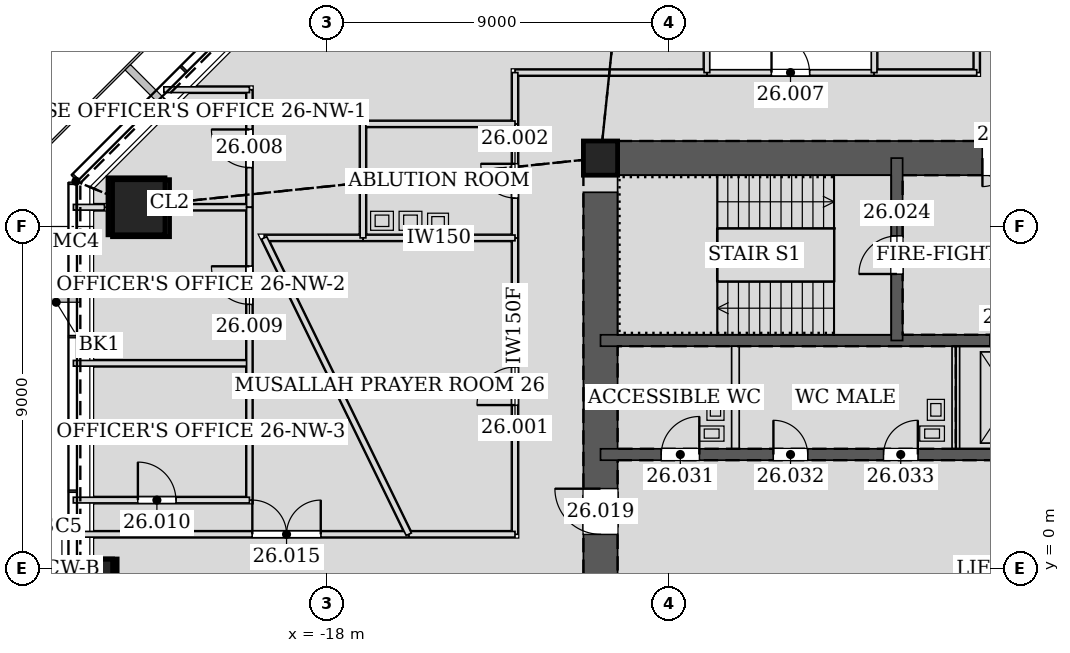
"""IFC4 building model, lengths in metres.
Left out: names, types, materials, properties, quantities, classifications, styles, units other than length and angle.
Written with IfcOpenShell. Run it as: python <this file> out.ifc"""

import sys

from ifc_helpers import new_model, si_unit, direction, frame, frame_2d, origin, origin_2d, place, context, subcontext, project, spatial, rectangle, hollow_rectangle, extrude, element, fill, save


model = new_model("IFC4")
c1 = context("Model", 3, precision=1e-05, world=origin(), true_north=direction((0.0, 1.0)))
c2 = subcontext(c1, "Body", "Model", "MODEL_VIEW")
j1 = project(units=[si_unit("LENGTHUNIT", "METRE"), si_unit("PLANEANGLEUNIT", "RADIAN")], contexts=[c1])
p1 = place(None, origin())
s1 = spatial("IfcSite", under=j1, at=p1, CompositionType="ELEMENT")
p2 = place(p1, origin())
s2 = spatial("IfcBuilding", under=s1, at=p2, CompositionType="ELEMENT")
p3 = place(p2, frame((0.0, 0.0, 117.6)))
s3 = spatial("IfcBuildingStorey", under=s2, at=p3, CompositionType="ELEMENT", Elevation=117.6)
p4 = place(p3, frame((-23.01, 9.531, 0.0), z_axis=(0.028295730207, -0.011736627314, 0.99953069149), x_axis=(0.383133442967, 0.923693003589, 0.0)))
e1 = element("IfcColumn", 1, at=p4, inside=s3, PredefinedType="COLUMN", context=c2, shape_type="SweptSolid", body=[
    extrude(hollow_rectangle(XDim=1.5, YDim=1.5, WallThickness=0.07, at=origin_2d()), origin(), (0.0, 0.0, 1.0), 4.202),
])
p5 = place(p3, frame((-23.888, 0.0, 0.0), z_axis=(0.028297679255, 0.0, 0.99959954049), x_axis=(0.0, 1.0, 0.0)))
e2 = element("IfcColumn", 2, at=p5, inside=s3, PredefinedType="COLUMN", context=c2, shape_type="SweptSolid", body=[
    extrude(hollow_rectangle(XDim=0.5, YDim=0.5, WallThickness=0.025, at=origin_2d()), origin(), (0.0, 0.0, 1.0), 4.202),
])
p6 = place(p3, frame((-10.8, 10.8, 0.0), z_axis=(0.0, 0.0, 1.0), x_axis=(1.0, 0.0, 0.0)))
e3 = element("IfcColumn", 3, at=p6, inside=s3, PredefinedType="COLUMN", context=c2, shape_type="SweptSolid", body=[
    extrude(hollow_rectangle(XDim=0.9, YDim=0.9, WallThickness=0.06, at=origin_2d()), origin(), (0.0, 0.0, 1.0), 4.2),
])
p7 = place(p3, frame((10.8, 10.8, 0.0), z_axis=(0.0, 0.0, 1.0), x_axis=(-1.0, 0.0, 0.0)))
e4 = element("IfcWall", 4, at=p7, inside=s3, PredefinedType="SOLIDWALL", context=c2, shape_type="SweptSolid", body=[
    extrude(rectangle(XDim=21.6, YDim=0.9, at=frame_2d((10.8, 0.0))), origin(), (0.0, 0.0, 1.0), 4.2),
])
p8 = place(p7, frame((10.05, 0.0, 0.0)))
e5 = element("IfcOpeningElement", 5, at=p8, cuts=e4, PredefinedType="OPENING", context=c2, shape_type="SweptSolid", body=[
    extrude(rectangle(XDim=1.5, YDim=2.1, at=frame_2d((0.75, 1.05))), frame((0.0, 0.46, 0.0), z_axis=(0.0, -1.0, 0.0), x_axis=(1.0, 0.0, 0.0)), (0.0, 0.0, 1.0), 0.92),
])
p9 = place(p3, frame((-10.8, 10.8, 0.0), z_axis=(0.0, 0.0, 1.0), x_axis=(0.0, -1.0, 0.0)))
e6 = element("IfcWall", 6, at=p9, inside=s3, PredefinedType="SOLIDWALL", context=c2, shape_type="SweptSolid", body=[
    extrude(rectangle(XDim=21.6, YDim=0.9, at=frame_2d((10.8, 0.0))), origin(), (0.0, 0.0, 1.0), 4.2),
])
p10 = place(p9, frame((8.7, 0.0, 0.0)))
e7 = element("IfcOpeningElement", 7, at=p10, cuts=e6, PredefinedType="OPENING", context=c2, shape_type="SweptSolid", body=[
    extrude(rectangle(XDim=1.2, YDim=2.1, at=frame_2d((0.6, 1.05))), frame((0.0, 0.46, 0.0), z_axis=(0.0, -1.0, 0.0), x_axis=(1.0, 0.0, 0.0)), (0.0, 0.0, 1.0), 0.92),
])
p11 = place(p9, frame((11.7, 0.0, 0.0)))
e8 = element("IfcOpeningElement", 8, at=p11, cuts=e6, PredefinedType="OPENING", context=c2, shape_type="SweptSolid", body=[
    extrude(rectangle(XDim=1.2, YDim=2.1, at=frame_2d((0.6, 1.05))), frame((0.0, 0.46, 0.0), z_axis=(0.0, -1.0, 0.0), x_axis=(1.0, 0.0, 0.0)), (0.0, 0.0, 1.0), 0.92),
])
p12 = place(p3, frame((-10.8, 3.0, 0.0), z_axis=(0.0, 0.0, 1.0), x_axis=(1.0, 0.0, 0.0)))
e9 = element("IfcWall", 9, at=p12, inside=s3, PredefinedType="SOLIDWALL", context=c2, shape_type="SweptSolid", body=[
    extrude(rectangle(XDim=21.6, YDim=0.3, at=frame_2d((10.8, 0.0))), origin(), (0.0, 0.0, 1.0), 4.2),
])
p13 = place(p12, frame((1.6, 0.0, 0.0)))
e10 = element("IfcOpeningElement", 10, at=p13, cuts=e9, PredefinedType="OPENING", context=c2, shape_type="SweptSolid", body=[
    extrude(rectangle(XDim=1.0, YDim=2.1, at=frame_2d((0.5, 1.05))), frame((0.0, 0.16, 0.0), z_axis=(0.0, -1.0, 0.0), x_axis=(1.0, 0.0, 0.0)), (0.0, 0.0, 1.0), 0.32),
])
p14 = place(p12, frame((4.55, 0.0, 0.0)))
e11 = element("IfcOpeningElement", 11, at=p14, cuts=e9, PredefinedType="OPENING", context=c2, shape_type="SweptSolid", body=[
    extrude(rectangle(XDim=0.9, YDim=2.1, at=frame_2d((0.45, 1.05))), frame((0.0, 0.16, 0.0), z_axis=(0.0, -1.0, 0.0), x_axis=(1.0, 0.0, 0.0)), (0.0, 0.0, 1.0), 0.32),
])
p15 = place(p12, frame((7.45, 0.0, 0.0)))
e12 = element("IfcOpeningElement", 12, at=p15, cuts=e9, PredefinedType="OPENING", context=c2, shape_type="SweptSolid", body=[
    extrude(rectangle(XDim=0.9, YDim=2.1, at=frame_2d((0.45, 1.05))), frame((0.0, 0.16, 0.0), z_axis=(0.0, -1.0, 0.0), x_axis=(1.0, 0.0, 0.0)), (0.0, 0.0, 1.0), 0.32),
])
p16 = place(p12, frame((13.25, 0.0, 0.0)))
e13 = element("IfcOpeningElement", 13, at=p16, cuts=e9, PredefinedType="OPENING", context=c2, shape_type="SweptSolid", body=[
    extrude(rectangle(XDim=0.9, YDim=2.1, at=frame_2d((0.45, 1.05))), frame((0.0, 0.16, 0.0), z_axis=(0.0, -1.0, 0.0), x_axis=(1.0, 0.0, 0.0)), (0.0, 0.0, 1.0), 0.32),
])
p17 = place(p3, frame((-10.8, 6.0, 0.0), z_axis=(0.0, 0.0, 1.0), x_axis=(1.0, 0.0, 0.0)))
e14 = element("IfcWall", 14, at=p17, inside=s3, PredefinedType="SOLIDWALL", context=c2, shape_type="SweptSolid", body=[
    extrude(rectangle(XDim=21.6, YDim=0.3, at=frame_2d((10.8, 0.0))), origin(), (0.0, 0.0, 1.0), 4.2),
])
p18 = place(p17, frame((10.25, 0.0, 0.0)))
e15 = element("IfcOpeningElement", 15, at=p18, cuts=e14, PredefinedType="OPENING", context=c2, shape_type="SweptSolid", body=[
    extrude(rectangle(XDim=1.1, YDim=2.1, at=frame_2d((0.55, 1.05))), frame((0.0, 0.16, 0.0), z_axis=(0.0, -1.0, 0.0), x_axis=(1.0, 0.0, 0.0)), (0.0, 0.0, 1.0), 0.32),
])
p19 = place(p3, frame((-3.0, 6.0, 0.0), z_axis=(0.0, 0.0, 1.0), x_axis=(0.0, 1.0, 0.0)))
e16 = element("IfcWall", 16, at=p19, inside=s3, PredefinedType="SOLIDWALL", context=c2, shape_type="SweptSolid", body=[
    extrude(rectangle(XDim=4.8, YDim=0.3, at=frame_2d((2.4, 0.0))), origin(), (0.0, 0.0, 1.0), 4.2),
])
p20 = place(p19, frame((1.75, 0.0, 0.0)))
e17 = element("IfcOpeningElement", 17, at=p20, cuts=e16, PredefinedType="OPENING", context=c2, shape_type="SweptSolid", body=[
    extrude(rectangle(XDim=1.0, YDim=2.1, at=frame_2d((0.5, 1.05))), frame((0.0, 0.16, 0.0), z_axis=(0.0, -1.0, 0.0), x_axis=(1.0, 0.0, 0.0)), (0.0, 0.0, 1.0), 0.32),
])
p21 = place(p3, frame((-13.05, 8.701, 0.0), z_axis=(0.0, 0.0, 1.0), x_axis=(0.0, -1.0, 0.0)))
e18 = element("IfcWall", 18, at=p21, inside=s3, PredefinedType="PARTITIONING", context=c2, shape_type="SweptSolid", body=[
    extrude(rectangle(XDim=7.801, YDim=0.15, at=frame_2d((3.9, 0.0))), origin(), (0.0, 0.0, 1.0), 4.035),
])
p22 = place(p21, frame((3.4, 0.0, 0.0)))
e19 = element("IfcOpeningElement", 19, at=p22, cuts=e18, PredefinedType="OPENING", context=c2, shape_type="SweptSolid", body=[
    extrude(rectangle(XDim=1.0, YDim=2.1, at=frame_2d((0.5, 1.05))), frame((0.0, 0.085, 0.0), z_axis=(0.0, -1.0, 0.0), x_axis=(1.0, 0.0, 0.0)), (0.0, 0.0, 1.0), 0.17),
])
p23 = place(p3, frame((-13.05, 0.9, 0.0), z_axis=(0.0, 0.0, 1.0), x_axis=(-1.0, 0.0, 0.0)))
e20 = element("IfcWall", 20, at=p23, inside=s3, PredefinedType="PARTITIONING", context=c2, shape_type="SweptSolid", body=[
    extrude(rectangle(XDim=2.797, YDim=0.15, at=frame_2d((1.398, 0.0))), origin(), (0.0, 0.0, 1.0), 3.426),
])
p24 = place(p3, frame((-13.05, 11.701, 0.0), z_axis=(0.0, 0.0, 1.0), x_axis=(0.0, -1.0, 0.0)))
e21 = element("IfcWall", 21, at=p24, inside=s3, PredefinedType="PARTITIONING", context=c2, shape_type="SweptSolid", body=[
    extrude(rectangle(XDim=3.002, YDim=0.15, at=frame_2d((1.501, 0.0))), origin(), (0.0, 0.0, 1.0), 3.098),
])
p25 = place(p24, frame((1.051, 0.0, 0.0)))
e22 = element("IfcOpeningElement", 22, at=p25, cuts=e21, PredefinedType="OPENING", context=c2, shape_type="SweptSolid", body=[
    extrude(rectangle(XDim=0.9, YDim=2.1, at=frame_2d((0.45, 1.05))), frame((0.0, 0.085, 0.0), z_axis=(0.0, -1.0, 0.0), x_axis=(1.0, 0.0, 0.0)), (0.0, 0.0, 1.0), 0.17),
])
p26 = place(p3, frame((-3.599, 13.05, 0.0), z_axis=(0.0, 0.0, 1.0), x_axis=(-1.0, 0.0, 0.0)))
e23 = element("IfcWall", 23, at=p26, inside=s3, PredefinedType="PARTITIONING", context=c2, shape_type="SweptSolid", body=[
    extrude(rectangle(XDim=4.402, YDim=0.15, at=frame_2d((2.201, 0.0))), origin(), (0.0, 0.0, 1.0), 4.035),
])
p27 = place(p26, frame((1.701, 0.0, 0.0)))
e24 = element("IfcOpeningElement", 24, at=p27, cuts=e23, PredefinedType="OPENING", context=c2, shape_type="SweptSolid", body=[
    extrude(rectangle(XDim=1.0, YDim=2.1, at=frame_2d((0.5, 1.05))), frame((0.0, 0.085, 0.0), z_axis=(0.0, -1.0, 0.0), x_axis=(1.0, 0.0, 0.0)), (0.0, 0.0, 1.0), 0.17),
])
p28 = place(p3, frame((-15.844, 0.9, 0.0), z_axis=(0.0, 0.0, 1.0), x_axis=(-1.0, 0.0, 0.0)))
e25 = element("IfcWall", 25, at=p28, inside=s3, PredefinedType="PARTITIONING", context=c2, shape_type="SweptSolid", body=[
    extrude(rectangle(XDim=8.828, YDim=0.15, at=frame_2d((4.414, 0.0))), origin(), (0.0, 0.0, 1.0), 3.491),
])
p29 = place(p28, frame((2.317, 0.0, 0.0)))
e26 = element("IfcOpeningElement", 26, at=p29, cuts=e25, PredefinedType="OPENING", context=c2, shape_type="SweptSolid", body=[
    extrude(rectangle(XDim=1.8, YDim=2.4, at=frame_2d((0.9, 1.2))), frame((0.0, 0.085, 0.0), z_axis=(0.0, -1.0, 0.0), x_axis=(1.0, 0.0, 0.0)), (0.0, 0.0, 1.0), 0.17),
])
p30 = place(p3, frame((-7.999, 13.05, 0.0), z_axis=(0.0, 0.0, 1.0), x_axis=(-1.0, 0.0, 0.0)))
e27 = element("IfcWall", 27, at=p30, inside=s3, PredefinedType="PARTITIONING", context=c2, shape_type="SweptSolid", body=[
    extrude(rectangle(XDim=5.051, YDim=0.15, at=frame_2d((2.525, 0.0))), origin(), (0.0, 0.0, 1.0), 3.098),
])
p31 = place(p3, frame((-13.05, 13.05, 0.0), z_axis=(0.0, 0.0, 1.0), x_axis=(0.0, -1.0, 0.0)))
e28 = element("IfcWall", 28, at=p31, inside=s3, PredefinedType="PARTITIONING", context=c2, shape_type="SweptSolid", body=[
    extrude(rectangle(XDim=1.351, YDim=0.15, at=frame_2d((0.676, 0.0))), origin(), (0.0, 0.0, 1.0), 3.184),
])
p32 = place(p3, frame((-0.9, 19.739, 0.0), z_axis=(0.0, 0.0, 1.0), x_axis=(0.0, -1.0, 0.0)))
e29 = element("IfcWall", 29, at=p32, inside=s3, PredefinedType="PARTITIONING", context=c2, shape_type="SweptSolid", body=[
    extrude(rectangle(XDim=6.689, YDim=0.15, at=frame_2d((3.344, 0.0))), origin(), (0.0, 0.0, 1.0), 3.426),
])
p33 = place(p3, frame((-0.9, 13.05, 0.0), z_axis=(0.0, 0.0, 1.0), x_axis=(-1.0, 0.0, 0.0)))
e30 = element("IfcWall", 30, at=p33, inside=s3, PredefinedType="PARTITIONING", context=c2, shape_type="SweptSolid", body=[
    extrude(rectangle(XDim=2.701, YDim=0.15, at=frame_2d((1.351, 0.0))), origin(), (0.0, 0.0, 1.0), 4.035),
])
p34 = place(p3, frame((-13.05, 8.7, 0.0), z_axis=(0.0, 0.0, 1.0), x_axis=(-1.0, 0.0, 0.0)))
e31 = element("IfcWall", 31, at=p34, inside=s3, PredefinedType="PARTITIONING", context=c2, shape_type="SweptSolid", body=[
    extrude(rectangle(XDim=4.001, YDim=0.15, at=frame_2d((2.0, 0.0))), origin(), (0.0, 0.0, 1.0), 3.426),
])
p35 = place(p3, frame((-17.049, 8.7, 0.0), z_axis=(0.0, 0.0, 1.0), x_axis=(-1.0, 0.0, 0.0)))
e32 = element("IfcWall", 32, at=p35, inside=s3, PredefinedType="PARTITIONING", context=c2, shape_type="SweptSolid", body=[
    extrude(rectangle(XDim=2.601, YDim=0.15, at=frame_2d((1.3, 0.0))), origin(), (0.0, 0.0, 1.0), 3.499),
])
p36 = place(p3, frame((-19.65, 8.7, 0.0), z_axis=(0.0, 0.0, 1.0), x_axis=(0.438358227548, -0.898800347319, 0.0)))
e33 = element("IfcWall", 33, at=p36, inside=s3, PredefinedType="PARTITIONING", context=c2, shape_type="SweptSolid", body=[
    extrude(rectangle(XDim=8.678, YDim=0.15, at=frame_2d((4.339, 0.0))), origin(), (0.0, 0.0, 1.0), 3.499),
])
p37 = place(p3, frame((-13.05, 11.7, 0.0), z_axis=(0.0, 0.0, 1.0), x_axis=(-1.0, 0.0, 0.0)))
e34 = element("IfcWall", 34, at=p37, inside=s3, PredefinedType="PARTITIONING", context=c2, shape_type="SweptSolid", body=[
    extrude(rectangle(XDim=4.0, YDim=0.15, at=frame_2d((2.0, 0.0))), origin(), (0.0, 0.0, 1.0), 3.715),
])
p38 = place(p3, frame((-17.05, 11.7, 0.0), z_axis=(0.0, 0.0, 1.0), x_axis=(0.0, -1.0, 0.0)))
e35 = element("IfcWall", 35, at=p38, inside=s3, PredefinedType="PARTITIONING", context=c2, shape_type="SweptSolid", body=[
    extrude(rectangle(XDim=3.0, YDim=0.15, at=frame_2d((1.5, 0.0))), origin(), (0.0, 0.0, 1.0), 3.098),
])
for number, where, z_axis, x_axis in (
    (36, (-3.6, 13.05, 0.0), (0.0, 0.0, 1.0), (0.0, 1.0, 0.0)),
    (37, (-8.0, 15.75, 0.0), (0.0, 0.0, 1.0), (0.0, -1.0, 0.0)),
):
    element("IfcWall", number, at=place(p3, frame(where, z_axis=z_axis, x_axis=x_axis)), inside=s3, PredefinedType="PARTITIONING", context=c2, shape_type="SweptSolid", body=[
        extrude(rectangle(XDim=2.7, YDim=0.15, at=frame_2d((1.35, 0.0))), origin(), (0.0, 0.0, 1.0), 3.426),
    ])
p39 = place(p3, frame((-24.67, 9.506, 0.0), z_axis=(0.0, 0.0, 1.0), x_axis=(1.0, 0.0, 0.0)))
e38 = element("IfcWall", 38, at=p39, inside=s3, PredefinedType="PARTITIONING", context=c2, shape_type="SweptSolid", body=[
    extrude(rectangle(XDim=0.817, YDim=0.15, at=frame_2d((0.409, 0.0))), origin(), (0.0, 0.0, 1.0), 4.035),
])
p40 = place(p3, frame((-22.048, 9.506, 0.0), z_axis=(0.0, 0.0, 1.0), x_axis=(1.0, 0.0, 0.0)))
e39 = element("IfcWall", 39, at=p40, inside=s3, PredefinedType="PARTITIONING", context=c2, shape_type="SweptSolid", body=[
    extrude(rectangle(XDim=2.01, YDim=0.15, at=frame_2d((1.005, 0.0))), origin(), (0.0, 0.0, 1.0), 3.098),
])
p41 = place(p3, frame((-20.038, 9.506, 0.0), z_axis=(0.0, 0.0, 1.0), x_axis=(0.0, 1.0, 0.0)))
e40 = element("IfcWall", 40, at=p41, inside=s3, PredefinedType="PARTITIONING", context=c2, shape_type="SweptSolid", body=[
    extrude(rectangle(XDim=3.094, YDim=0.15, at=frame_2d((1.547, 0.0))), origin(), (0.0, 0.0, 1.0), 3.098),
])
p42 = place(p41, frame((1.047, 0.0, 0.0)))
e41 = element("IfcOpeningElement", 41, at=p42, cuts=e40, PredefinedType="OPENING", context=c2, shape_type="SweptSolid", body=[
    extrude(rectangle(XDim=1.0, YDim=2.1, at=frame_2d((0.5, 1.05))), frame((0.0, 0.085, 0.0), z_axis=(0.0, -1.0, 0.0), x_axis=(1.0, 0.0, 0.0)), (0.0, 0.0, 1.0), 0.17),
])
p43 = place(p3, frame((-20.038, 12.6, 0.0), z_axis=(0.0, 0.0, 1.0), x_axis=(-1.0, 0.0, 0.0)))
e42 = element("IfcWall", 42, at=p43, inside=s3, PredefinedType="PARTITIONING", context=c2, shape_type="SweptSolid", body=[
    extrude(rectangle(XDim=2.252, YDim=0.15, at=frame_2d((1.126, 0.0))), origin(), (0.0, 0.0, 1.0), 3.499),
])
p44 = place(p3, frame((-24.67, 5.4, 0.0), z_axis=(0.0, 0.0, 1.0), x_axis=(1.0, 0.0, 0.0)))
e43 = element("IfcWall", 43, at=p44, inside=s3, PredefinedType="PARTITIONING", context=c2, shape_type="SweptSolid", body=[
    extrude(rectangle(XDim=4.632, YDim=0.15, at=frame_2d((2.316, 0.0))), origin(), (0.0, 0.0, 1.0), 3.491),
])
p45 = place(p3, frame((-20.038, 9.506, 0.0), z_axis=(0.0, 0.0, 1.0), x_axis=(0.0, -1.0, 0.0)))
e44 = element("IfcWall", 44, at=p45, inside=s3, PredefinedType="PARTITIONING", context=c2, shape_type="SweptSolid", body=[
    extrude(rectangle(XDim=7.706, YDim=0.15, at=frame_2d((3.853, 0.0))), origin(), (0.0, 0.0, 1.0), 4.035),
])
p46 = place(p45, frame((1.553, 0.0, 0.0)))
e45 = element("IfcOpeningElement", 45, at=p46, cuts=e44, PredefinedType="OPENING", context=c2, shape_type="SweptSolid", body=[
    extrude(rectangle(XDim=1.0, YDim=2.1, at=frame_2d((0.5, 1.05))), frame((0.0, 0.085, 0.0), z_axis=(0.0, -1.0, 0.0), x_axis=(1.0, 0.0, 0.0)), (0.0, 0.0, 1.0), 0.17),
])
p47 = place(p3, frame((-24.672, 1.8, 0.0), z_axis=(0.0, 0.0, 1.0), x_axis=(1.0, 0.0, 0.0)))
e46 = element("IfcWall", 46, at=p47, inside=s3, PredefinedType="PARTITIONING", context=c2, shape_type="SweptSolid", body=[
    extrude(rectangle(XDim=4.634, YDim=0.15, at=frame_2d((2.317, 0.0))), origin(), (0.0, 0.0, 1.0), 3.491),
])
p48 = place(p47, frame((1.699, 0.0, 0.0)))
e47 = element("IfcOpeningElement", 47, at=p48, cuts=e46, PredefinedType="OPENING", context=c2, shape_type="SweptSolid", body=[
    extrude(rectangle(XDim=1.0, YDim=2.1, at=frame_2d((0.5, 1.05))), frame((0.0, 0.085, 0.0), z_axis=(0.0, -1.0, 0.0), x_axis=(1.0, 0.0, 0.0)), (0.0, 0.0, 1.0), 0.17),
])
for number, where, z_axis, x_axis in (
    (48, (-7.25, 3.15, 0.0), (0.0, 0.0, 1.0), (0.0, 1.0, 0.0)),
    (49, (-1.45, 3.15, 0.0), (0.0, 0.0, 1.0), (0.0, 1.0, 0.0)),
):
    element("IfcWall", number, at=place(p3, frame(where, z_axis=z_axis, x_axis=x_axis)), inside=s3, PredefinedType="PARTITIONING", context=c2, shape_type="SweptSolid", body=[
        extrude(rectangle(XDim=2.7, YDim=0.2, at=frame_2d((1.35, 0.0))), origin(), (0.0, 0.0, 1.0), 4.035),
    ])
p49 = place(p22, frame((1.0, 0.0, 0.0), z_axis=(0.0, 0.0, 1.0), x_axis=(-1.0, 0.0, 0.0)))
e50 = element("IfcDoor", 50, at=p49, inside=s3, OperationType="SINGLE_SWING_LEFT", PredefinedType="DOOR", context=c2, shape_type="SweptSolid", body=[
    extrude(rectangle(XDim=1.0, YDim=2.1, at=frame_2d((0.5, 1.05))), frame((0.0, 0.025, 0.0), z_axis=(0.0, -1.0, 0.0), x_axis=(1.0, 0.0, 0.0)), (0.0, 0.0, 1.0), 0.05),
])
fill(e19, e50)
p50 = place(p25, frame((0.9, 0.0, 0.0), z_axis=(0.0, 0.0, 1.0), x_axis=(-1.0, 0.0, 0.0)))
e51 = element("IfcDoor", 51, at=p50, inside=s3, OperationType="SINGLE_SWING_RIGHT", PredefinedType="DOOR", context=c2, shape_type="SweptSolid", body=[
    extrude(rectangle(XDim=0.9, YDim=2.1, at=frame_2d((0.45, 1.05))), frame((0.0, 0.025, 0.0), z_axis=(0.0, -1.0, 0.0), x_axis=(1.0, 0.0, 0.0)), (0.0, 0.0, 1.0), 0.05),
])
fill(e22, e51)
p51 = place(p27, frame((1.0, 0.0, 0.0), z_axis=(0.0, 0.0, 1.0), x_axis=(-1.0, 0.0, 0.0)))
e52 = element("IfcDoor", 52, at=p51, inside=s3, OperationType="SINGLE_SWING_LEFT", PredefinedType="DOOR", context=c2, shape_type="SweptSolid", body=[
    extrude(rectangle(XDim=1.0, YDim=2.1, at=frame_2d((0.5, 1.05))), frame((0.0, 0.025, 0.0), z_axis=(0.0, -1.0, 0.0), x_axis=(1.0, 0.0, 0.0)), (0.0, 0.0, 1.0), 0.05),
])
fill(e24, e52)
p52 = place(p42, origin())
e53 = element("IfcDoor", 53, at=p52, inside=s3, OperationType="SINGLE_SWING_RIGHT", PredefinedType="DOOR", context=c2, shape_type="SweptSolid", body=[
    extrude(rectangle(XDim=1.0, YDim=2.1, at=frame_2d((0.5, 1.05))), frame((0.0, 0.025, 0.0), z_axis=(0.0, -1.0, 0.0), x_axis=(1.0, 0.0, 0.0)), (0.0, 0.0, 1.0), 0.05),
])
fill(e41, e53)
p53 = place(p46, frame((1.0, 0.0, 0.0), z_axis=(0.0, 0.0, 1.0), x_axis=(-1.0, 0.0, 0.0)))
e54 = element("IfcDoor", 54, at=p53, inside=s3, OperationType="SINGLE_SWING_RIGHT", PredefinedType="DOOR", context=c2, shape_type="SweptSolid", body=[
    extrude(rectangle(XDim=1.0, YDim=2.1, at=frame_2d((0.5, 1.05))), frame((0.0, 0.025, 0.0), z_axis=(0.0, -1.0, 0.0), x_axis=(1.0, 0.0, 0.0)), (0.0, 0.0, 1.0), 0.05),
])
fill(e45, e54)
p54 = place(p48, origin())
e55 = element("IfcDoor", 55, at=p54, inside=s3, OperationType="SINGLE_SWING_LEFT", PredefinedType="DOOR", context=c2, shape_type="SweptSolid", body=[
    extrude(rectangle(XDim=1.0, YDim=2.1, at=frame_2d((0.5, 1.05))), frame((0.0, 0.025, 0.0), z_axis=(0.0, -1.0, 0.0), x_axis=(1.0, 0.0, 0.0)), (0.0, 0.0, 1.0), 0.05),
])
fill(e47, e55)
p55 = place(p29, frame((1.8, 0.0, 0.0), z_axis=(0.0, 0.0, 1.0), x_axis=(-1.0, 0.0, 0.0)))
e56 = element("IfcDoor", 56, at=p55, inside=s3, OperationType="DOUBLE_DOOR_SINGLE_SWING", PredefinedType="DOOR", context=c2, shape_type="SweptSolid", body=[
    extrude(rectangle(XDim=1.8, YDim=2.4, at=frame_2d((0.9, 1.2))), frame((0.0, 0.025, 0.0), z_axis=(0.0, -1.0, 0.0), x_axis=(1.0, 0.0, 0.0)), (0.0, 0.0, 1.0), 0.05),
])
fill(e26, e56)
p56 = place(p10, frame((1.2, 0.0, 0.0), z_axis=(0.0, 0.0, 1.0), x_axis=(-1.0, 0.0, 0.0)))
e57 = element("IfcDoor", 57, at=p56, inside=s3, OperationType="SINGLE_SWING_RIGHT", PredefinedType="DOOR", context=c2, shape_type="SweptSolid", body=[
    extrude(rectangle(XDim=1.2, YDim=2.1, at=frame_2d((0.6, 1.05))), frame((0.0, 0.025, 0.0), z_axis=(0.0, -1.0, 0.0), x_axis=(1.0, 0.0, 0.0)), (0.0, 0.0, 1.0), 0.05),
])
fill(e7, e57)
p57 = place(p8, origin())
e58 = element("IfcDoor", 58, at=p57, inside=s3, OperationType="DOUBLE_DOOR_SINGLE_SWING", PredefinedType="DOOR", context=c2, shape_type="SweptSolid", body=[
    extrude(rectangle(XDim=1.5, YDim=2.1, at=frame_2d((0.75, 1.05))), frame((0.0, 0.025, 0.0), z_axis=(0.0, -1.0, 0.0), x_axis=(1.0, 0.0, 0.0)), (0.0, 0.0, 1.0), 0.05),
])
fill(e5, e58)
p58 = place(p20, origin())
e59 = element("IfcDoor", 59, at=p58, inside=s3, OperationType="SINGLE_SWING_LEFT", PredefinedType="DOOR", context=c2, shape_type="SweptSolid", body=[
    extrude(rectangle(XDim=1.0, YDim=2.1, at=frame_2d((0.5, 1.05))), frame((0.0, 0.025, 0.0), z_axis=(0.0, -1.0, 0.0), x_axis=(1.0, 0.0, 0.0)), (0.0, 0.0, 1.0), 0.05),
])
fill(e17, e59)
p59 = place(p13, origin())
e60 = element("IfcDoor", 60, at=p59, inside=s3, OperationType="SINGLE_SWING_RIGHT", PredefinedType="DOOR", context=c2, shape_type="SweptSolid", body=[
    extrude(rectangle(XDim=1.0, YDim=2.1, at=frame_2d((0.5, 1.05))), frame((0.0, 0.025, 0.0), z_axis=(0.0, -1.0, 0.0), x_axis=(1.0, 0.0, 0.0)), (0.0, 0.0, 1.0), 0.05),
])
fill(e10, e60)
p60 = place(p14, origin())
e61 = element("IfcDoor", 61, at=p60, inside=s3, OperationType="SINGLE_SWING_LEFT", PredefinedType="DOOR", context=c2, shape_type="SweptSolid", body=[
    extrude(rectangle(XDim=0.9, YDim=2.1, at=frame_2d((0.45, 1.05))), frame((0.0, 0.025, 0.0), z_axis=(0.0, -1.0, 0.0), x_axis=(1.0, 0.0, 0.0)), (0.0, 0.0, 1.0), 0.05),
])
fill(e11, e61)
p61 = place(p15, origin())
e62 = element("IfcDoor", 62, at=p61, inside=s3, OperationType="SINGLE_SWING_RIGHT", PredefinedType="DOOR", context=c2, shape_type="SweptSolid", body=[
    extrude(rectangle(XDim=0.9, YDim=2.1, at=frame_2d((0.45, 1.05))), frame((0.0, 0.025, 0.0), z_axis=(0.0, -1.0, 0.0), x_axis=(1.0, 0.0, 0.0)), (0.0, 0.0, 1.0), 0.05),
])
fill(e12, e62)
save(model, sys.argv[1])
